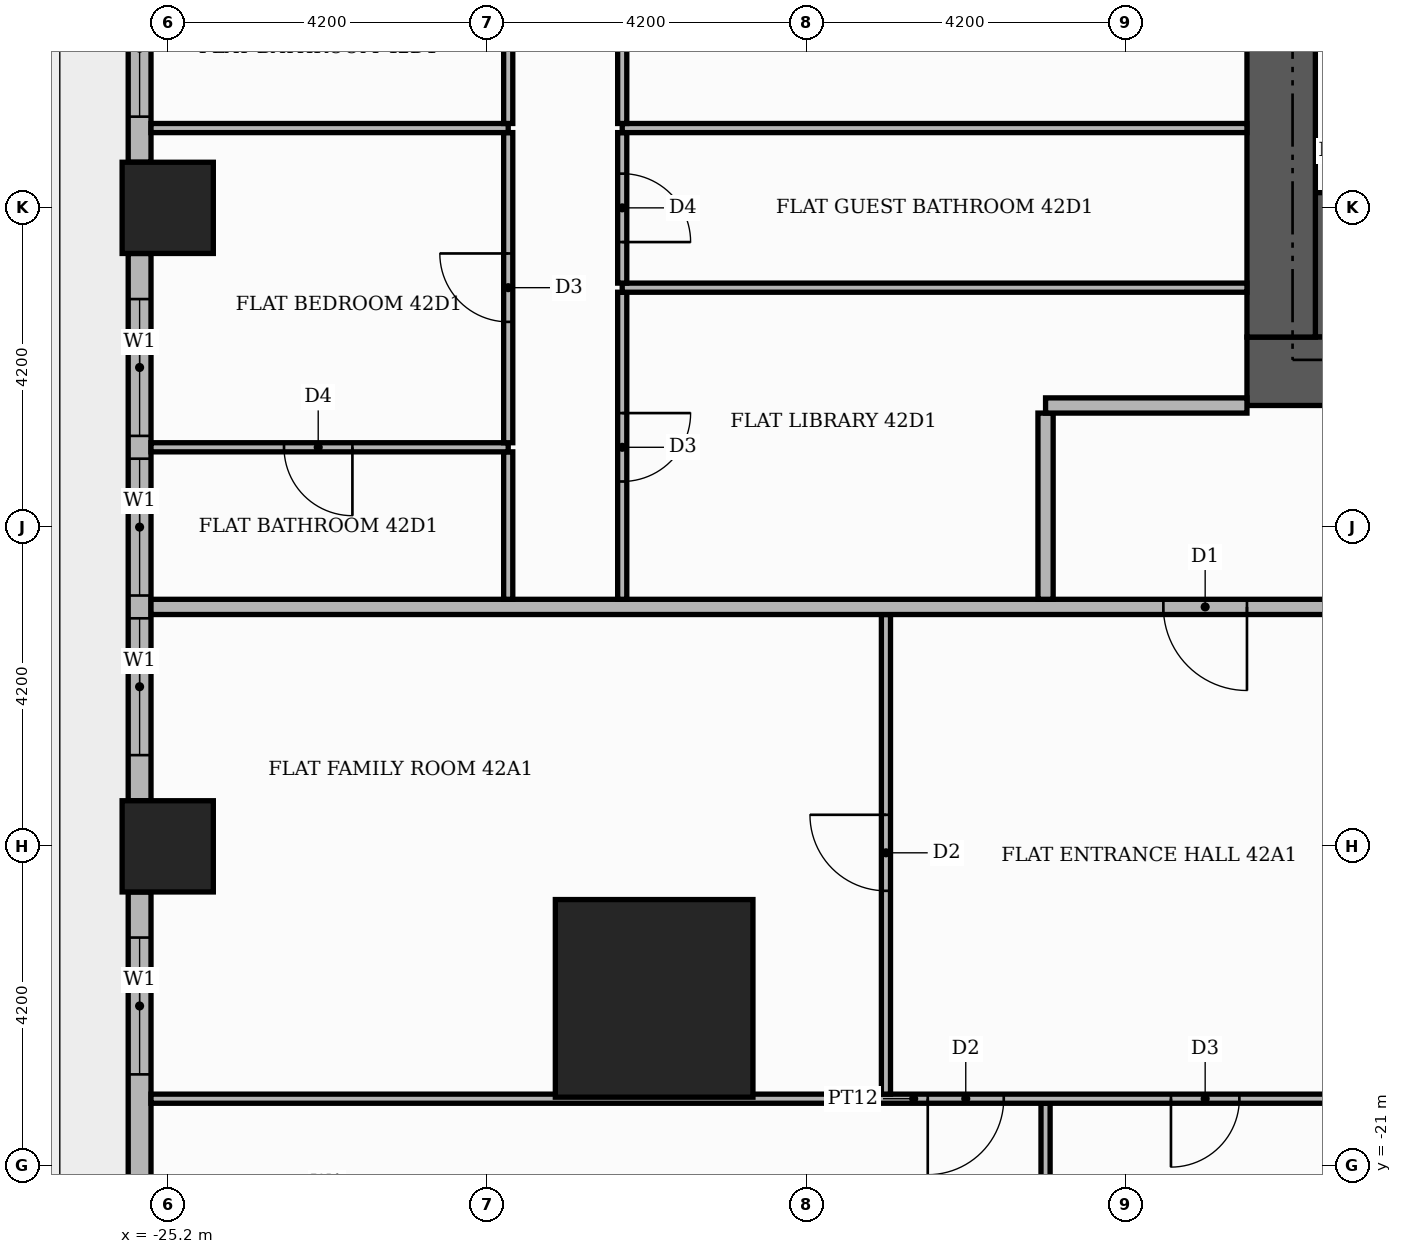
"""IFC4 building model, lengths in metres.
Left out: names, types, materials, properties, quantities, classifications, styles, units other than length and angle.
Written with IfcOpenShell. Run it as: python <this file> out.ifc"""

import sys

from ifc_helpers import new_model, si_unit, direction, frame, frame_2d, origin, origin_2d, place, context, subcontext, project, spatial, rectangle, extrude, element, fill, save


model = new_model("IFC4")
c1 = context("Model", 3, precision=1e-05, world=origin(), true_north=direction((0.0, 1.0)))
c2 = subcontext(c1, "Body", "Model", "MODEL_VIEW")
j1 = project(units=[si_unit("LENGTHUNIT", "METRE"), si_unit("PLANEANGLEUNIT", "RADIAN")], contexts=[c1])
p1 = place(None, origin())
s1 = spatial("IfcSite", under=j1, at=p1, CompositionType="ELEMENT")
p2 = place(p1, origin())
s2 = spatial("IfcBuilding", under=s1, at=p2, CompositionType="ELEMENT")
p3 = place(p2, frame((0.0, 0.0, 176.7)))
s3 = spatial("IfcBuildingStorey", under=s2, at=p3, CompositionType="ELEMENT", Elevation=176.7)
p4 = place(p3, frame((-10.1, -9.15, 0.0), z_axis=(0.0, 0.0, 1.0), x_axis=(1.0, 0.0, 0.0)))
e1 = element("IfcWall", 1, at=p4, inside=s3, PredefinedType="SHEAR", context=c2, shape_type="SweptSolid", body=[
    extrude(rectangle(XDim=4.6, YDim=1.9, at=frame_2d((2.3, 0.0))), origin(), (0.0, 0.0, 1.0), 3.4),
])
p5 = place(p3, frame((-11.0, -10.55, 0.0), z_axis=(0.0, 0.0, 1.0), x_axis=(1.0, 0.0, 0.0)))
e2 = element("IfcWall", 2, at=p5, inside=s3, PredefinedType="SHEAR", context=c2, shape_type="SweptSolid", body=[
    extrude(rectangle(XDim=22.0, YDim=0.9, at=frame_2d((11.0, 0.0))), origin(), (0.0, 0.0, 1.0), 3.4),
])
p6 = place(p5, frame((7.4, 0.0, 0.0)))
e3 = element("IfcOpeningElement", 3, at=p6, cuts=e2, PredefinedType="OPENING", context=c2, shape_type="SweptSolid", body=[
    extrude(rectangle(XDim=1.8, YDim=2.2, at=frame_2d((0.9, 1.1))), frame((0.0, 0.46, 0.0), z_axis=(0.0, -1.0, 0.0), x_axis=(1.0, 0.0, 0.0)), (0.0, 0.0, 1.0), 0.92),
])
p7 = place(p3, frame((-10.55, -10.1, 0.0), z_axis=(0.0, 0.0, 1.0), x_axis=(0.0, 1.0, 0.0)))
e4 = element("IfcWall", 4, at=p7, inside=s3, PredefinedType="SHEAR", context=c2, shape_type="SweptSolid", body=[
    extrude(rectangle(XDim=20.2, YDim=0.9, at=frame_2d((10.1, 0.0))), origin(), (0.0, 0.0, 1.0), 3.4),
])
p8 = place(p3, frame((-18.8, -18.8, 0.0), z_axis=(0.0, 0.0, 1.0), x_axis=(1.0, 0.0, 0.0)))
e5 = element("IfcColumn", 5, at=p8, inside=s3, PredefinedType="COLUMN", context=c2, shape_type="SweptSolid", body=[
    extrude(rectangle(XDim=2.6, YDim=2.6, at=origin_2d()), origin(), (0.0, 0.0, 1.0), 3.9),
])
for number, where, z_axis, x_axis in (
    (6, (-25.2, -8.4, 0.0), (0.0, 0.0, 1.0), (1.0, 0.0, 0.0)),
    (7, (-25.2, -16.8, 0.0), (0.0, 0.0, 1.0), (1.0, 0.0, 0.0)),
):
    element("IfcColumn", number, at=place(p3, frame(where, z_axis=z_axis, x_axis=x_axis)), inside=s3, PredefinedType="COLUMN", context=c2, shape_type="SweptSolid", body=[
        extrude(rectangle(XDim=1.2, YDim=1.2, at=origin_2d()), origin(), (0.0, 0.0, 1.0), 3.9),
    ])
p9 = place(p3, frame((-25.57, -0.6, 0.0), z_axis=(0.0, 0.0, 1.0), x_axis=(0.0, -1.0, 0.0)))
e8 = element("IfcWall", 8, at=p9, inside=s3, PredefinedType="STANDARD", context=c2, shape_type="SweptSolid", body=[
    extrude(rectangle(XDim=7.2, YDim=0.3, at=frame_2d((3.6, 0.0))), origin(), (0.0, 0.0, 1.0), 3.4),
])
p10 = place(p9, frame((0.6, 0.0, 0.9)))
e9 = element("IfcOpeningElement", 9, at=p10, cuts=e8, PredefinedType="OPENING", context=c2, shape_type="SweptSolid", body=[
    extrude(rectangle(XDim=3.9, YDim=2.1, at=frame_2d((1.95, 1.05))), frame((0.0, 0.16, 0.0), z_axis=(0.0, -1.0, 0.0), x_axis=(1.0, 0.0, 0.0)), (0.0, 0.0, 1.0), 0.32),
])
p11 = place(p9, frame((4.8, 0.0, 0.9)))
e10 = element("IfcOpeningElement", 10, at=p11, cuts=e8, PredefinedType="OPENING", context=c2, shape_type="SweptSolid", body=[
    extrude(rectangle(XDim=1.8, YDim=2.1, at=frame_2d((0.9, 1.05))), frame((0.0, 0.16, 0.0), z_axis=(0.0, -1.0, 0.0), x_axis=(1.0, 0.0, 0.0)), (0.0, 0.0, 1.0), 0.32),
])
p12 = place(p3, frame((-25.57, -9.0, 0.0), z_axis=(0.0, 0.0, 1.0), x_axis=(0.0, -1.0, 0.0)))
e11 = element("IfcWall", 11, at=p12, inside=s3, PredefinedType="STANDARD", context=c2, shape_type="SweptSolid", body=[
    extrude(rectangle(XDim=7.2, YDim=0.3, at=frame_2d((3.6, 0.0))), origin(), (0.0, 0.0, 1.0), 3.4),
])
p13 = place(p12, frame((0.6, 0.0, 0.9)))
e12 = element("IfcOpeningElement", 12, at=p13, cuts=e11, PredefinedType="OPENING", context=c2, shape_type="SweptSolid", body=[
    extrude(rectangle(XDim=1.8, YDim=2.1, at=frame_2d((0.9, 1.05))), frame((0.0, 0.16, 0.0), z_axis=(0.0, -1.0, 0.0), x_axis=(1.0, 0.0, 0.0)), (0.0, 0.0, 1.0), 0.32),
])
p14 = place(p12, frame((2.7, 0.0, 0.9)))
e13 = element("IfcOpeningElement", 13, at=p14, cuts=e11, PredefinedType="OPENING", context=c2, shape_type="SweptSolid", body=[
    extrude(rectangle(XDim=1.8, YDim=2.1, at=frame_2d((0.9, 1.05))), frame((0.0, 0.16, 0.0), z_axis=(0.0, -1.0, 0.0), x_axis=(1.0, 0.0, 0.0)), (0.0, 0.0, 1.0), 0.32),
])
p15 = place(p12, frame((4.8, 0.0, 0.9)))
e14 = element("IfcOpeningElement", 14, at=p15, cuts=e11, PredefinedType="OPENING", context=c2, shape_type="SweptSolid", body=[
    extrude(rectangle(XDim=1.8, YDim=2.1, at=frame_2d((0.9, 1.05))), frame((0.0, 0.16, 0.0), z_axis=(0.0, -1.0, 0.0), x_axis=(1.0, 0.0, 0.0)), (0.0, 0.0, 1.0), 0.32),
])
p16 = place(p3, frame((-25.57, -17.4, 0.0), z_axis=(0.0, 0.0, 1.0), x_axis=(0.0, -1.0, 0.0)))
e15 = element("IfcWall", 15, at=p16, inside=s3, PredefinedType="STANDARD", context=c2, shape_type="SweptSolid", body=[
    extrude(rectangle(XDim=4.32, YDim=0.3, at=frame_2d((2.16, 0.0))), origin(), (0.0, 0.0, 1.0), 3.4),
])
p17 = place(p16, frame((0.6, 0.0, 0.9)))
e16 = element("IfcOpeningElement", 16, at=p17, cuts=e15, PredefinedType="OPENING", context=c2, shape_type="SweptSolid", body=[
    extrude(rectangle(XDim=1.8, YDim=2.1, at=frame_2d((0.9, 1.05))), frame((0.0, 0.16, 0.0), z_axis=(0.0, -1.0, 0.0), x_axis=(1.0, 0.0, 0.0)), (0.0, 0.0, 1.0), 0.32),
])
p18 = place(p3, frame((-13.65, -25.42, 0.0), z_axis=(0.0, 0.0, 1.0), x_axis=(0.0, 1.0, 0.0)))
e17 = element("IfcWall", 17, at=p18, inside=s3, PredefinedType="PARTITIONING", context=c2, shape_type="SweptSolid", body=[
    extrude(rectangle(XDim=5.24, YDim=0.12, at=frame_2d((2.62, 0.0))), origin(), (0.0, 0.0, 1.0), 3.4),
])
p19 = place(p3, frame((-25.42, -20.12, 0.0), z_axis=(0.0, 0.0, 1.0), x_axis=(1.0, 0.0, 0.0)))
e18 = element("IfcWall", 18, at=p19, inside=s3, PredefinedType="PARTITIONING", context=c2, shape_type="SweptSolid", body=[
    extrude(rectangle(XDim=20.07, YDim=0.12, at=frame_2d((10.035, 0.0))), origin(), (0.0, 0.0, 1.0), 3.4),
])
p20 = place(p19, frame((10.22, 0.0, 0.0)))
e19 = element("IfcOpeningElement", 19, at=p20, cuts=e18, PredefinedType="OPENING", context=c2, shape_type="SweptSolid", body=[
    extrude(rectangle(XDim=1.0, YDim=2.1, at=frame_2d((0.5, 1.05))), frame((0.0, 0.07, 0.0), z_axis=(0.0, -1.0, 0.0), x_axis=(1.0, 0.0, 0.0)), (0.0, 0.0, 1.0), 0.14),
])
p21 = place(p19, frame((13.42, 0.0, 0.0)))
e20 = element("IfcOpeningElement", 20, at=p21, cuts=e18, PredefinedType="OPENING", context=c2, shape_type="SweptSolid", body=[
    extrude(rectangle(XDim=0.9, YDim=2.1, at=frame_2d((0.45, 1.05))), frame((0.0, 0.07, 0.0), z_axis=(0.0, -1.0, 0.0), x_axis=(1.0, 0.0, 0.0)), (0.0, 0.0, 1.0), 0.14),
])
p22 = place(p3, frame((-15.75, -20.06, 0.0), z_axis=(0.0, 0.0, 1.0), x_axis=(0.0, 1.0, 0.0)))
e21 = element("IfcWall", 21, at=p22, inside=s3, PredefinedType="PARTITIONING", context=c2, shape_type="SweptSolid", body=[
    extrude(rectangle(XDim=6.31, YDim=0.12, at=frame_2d((3.155, 0.0))), origin(), (0.0, 0.0, 1.0), 3.4),
])
p23 = place(p22, frame((2.675, 0.0, 0.0)))
e22 = element("IfcOpeningElement", 22, at=p23, cuts=e21, PredefinedType="OPENING", context=c2, shape_type="SweptSolid", body=[
    extrude(rectangle(XDim=1.0, YDim=2.1, at=frame_2d((0.5, 1.05))), frame((0.0, 0.07, 0.0), z_axis=(0.0, -1.0, 0.0), x_axis=(1.0, 0.0, 0.0)), (0.0, 0.0, 1.0), 0.14),
])
p24 = place(p3, frame((-25.42, -13.65, 0.0), z_axis=(0.0, 0.0, 1.0), x_axis=(1.0, 0.0, 0.0)))
e23 = element("IfcWall", 23, at=p24, inside=s3, PredefinedType="PARTITIONING", context=c2, shape_type="SweptSolid", body=[
    extrude(rectangle(XDim=39.07, YDim=0.2, at=frame_2d((19.535, 0.0))), origin(), (0.0, 0.0, 1.0), 3.4),
])
p25 = place(p24, frame((13.32, 0.0, 0.0)))
e24 = element("IfcOpeningElement", 24, at=p25, cuts=e23, PredefinedType="OPENING", context=c2, shape_type="SweptSolid", body=[
    extrude(rectangle(XDim=1.1, YDim=2.4, at=frame_2d((0.55, 1.2))), frame((0.0, 0.11, 0.0), z_axis=(0.0, -1.0, 0.0), x_axis=(1.0, 0.0, 0.0)), (0.0, 0.0, 1.0), 0.22),
])
p26 = place(p24, frame((21.72, 0.0, 0.0)))
e25 = element("IfcOpeningElement", 25, at=p26, cuts=e23, PredefinedType="OPENING", context=c2, shape_type="SweptSolid", body=[
    extrude(rectangle(XDim=1.1, YDim=2.4, at=frame_2d((0.55, 1.2))), frame((0.0, 0.11, 0.0), z_axis=(0.0, -1.0, 0.0), x_axis=(1.0, 0.0, 0.0)), (0.0, 0.0, 1.0), 0.22),
])
p27 = place(p3, frame((-20.72, -13.55, 0.0), z_axis=(0.0, 0.0, 1.0), x_axis=(0.0, 1.0, 0.0)))
e26 = element("IfcWall", 26, at=p27, inside=s3, PredefinedType="PARTITIONING", context=c2, shape_type="SweptSolid", body=[
    extrude(rectangle(XDim=1.94, YDim=0.12, at=frame_2d((0.97, 0.0))), origin(), (0.0, 0.0, 1.0), 3.4),
])
p28 = place(p3, frame((-19.22, -13.55, 0.0), z_axis=(0.0, 0.0, 1.0), x_axis=(0.0, 1.0, 0.0)))
e27 = element("IfcWall", 27, at=p28, inside=s3, PredefinedType="PARTITIONING", context=c2, shape_type="SweptSolid", body=[
    extrude(rectangle(XDim=4.04, YDim=0.12, at=frame_2d((2.02, 0.0))), origin(), (0.0, 0.0, 1.0), 3.4),
])
p29 = place(p28, frame((1.55, 0.0, 0.0)))
e28 = element("IfcOpeningElement", 28, at=p29, cuts=e27, PredefinedType="OPENING", context=c2, shape_type="SweptSolid", body=[
    extrude(rectangle(XDim=0.9, YDim=2.1, at=frame_2d((0.45, 1.05))), frame((0.0, 0.07, 0.0), z_axis=(0.0, -1.0, 0.0), x_axis=(1.0, 0.0, 0.0)), (0.0, 0.0, 1.0), 0.14),
])
p30 = place(p3, frame((-13.65, -13.55, 0.0), z_axis=(0.0, 0.0, 1.0), x_axis=(0.0, 1.0, 0.0)))
e29 = element("IfcWall", 29, at=p30, inside=s3, PredefinedType="PARTITIONING", context=c2, shape_type="SweptSolid", body=[
    extrude(rectangle(XDim=2.45, YDim=0.2, at=frame_2d((1.225, 0.0))), origin(), (0.0, 0.0, 1.0), 3.4),
])
p31 = place(p3, frame((-25.42, -11.55, 0.0), z_axis=(0.0, 0.0, 1.0), x_axis=(1.0, 0.0, 0.0)))
e30 = element("IfcWall", 30, at=p31, inside=s3, PredefinedType="PARTITIONING", context=c2, shape_type="SweptSolid", body=[
    extrude(rectangle(XDim=4.7, YDim=0.12, at=frame_2d((2.35, 0.0))), origin(), (0.0, 0.0, 1.0), 3.4),
])
p32 = place(p31, frame((1.75, 0.0, 0.0)))
e31 = element("IfcOpeningElement", 31, at=p32, cuts=e30, PredefinedType="OPENING", context=c2, shape_type="SweptSolid", body=[
    extrude(rectangle(XDim=0.9, YDim=2.1, at=frame_2d((0.45, 1.05))), frame((0.0, 0.07, 0.0), z_axis=(0.0, -1.0, 0.0), x_axis=(1.0, 0.0, 0.0)), (0.0, 0.0, 1.0), 0.14),
])
p33 = place(p3, frame((-20.72, -11.49, 0.0), z_axis=(0.0, 0.0, 1.0), x_axis=(0.0, 1.0, 0.0)))
e32 = element("IfcWall", 32, at=p33, inside=s3, PredefinedType="PARTITIONING", context=c2, shape_type="SweptSolid", body=[
    extrude(rectangle(XDim=4.08, YDim=0.12, at=frame_2d((2.04, 0.0))), origin(), (0.0, 0.0, 1.0), 3.4),
])
p34 = place(p33, frame((1.59, 0.0, 0.0)))
e33 = element("IfcOpeningElement", 33, at=p34, cuts=e32, PredefinedType="OPENING", context=c2, shape_type="SweptSolid", body=[
    extrude(rectangle(XDim=0.9, YDim=2.1, at=frame_2d((0.45, 1.05))), frame((0.0, 0.07, 0.0), z_axis=(0.0, -1.0, 0.0), x_axis=(1.0, 0.0, 0.0)), (0.0, 0.0, 1.0), 0.14),
])
p35 = place(p3, frame((-13.65, -11.0, 0.0), z_axis=(0.0, 0.0, 1.0), x_axis=(1.0, 0.0, 0.0)))
e34 = element("IfcWall", 34, at=p35, inside=s3, PredefinedType="PARTITIONING", context=c2, shape_type="SweptSolid", body=[
    extrude(rectangle(XDim=2.65, YDim=0.2, at=frame_2d((1.325, 0.0))), origin(), (0.0, 0.0, 1.0), 3.4),
])
p36 = place(p3, frame((-19.22, -9.45, 0.0), z_axis=(0.0, 0.0, 1.0), x_axis=(1.0, 0.0, 0.0)))
e35 = element("IfcWall", 35, at=p36, inside=s3, PredefinedType="PARTITIONING", context=c2, shape_type="SweptSolid", body=[
    extrude(rectangle(XDim=8.22, YDim=0.12, at=frame_2d((4.11, 0.0))), origin(), (0.0, 0.0, 1.0), 3.4),
])
p37 = place(p3, frame((-19.22, -9.39, 0.0), z_axis=(0.0, 0.0, 1.0), x_axis=(0.0, 1.0, 0.0)))
e36 = element("IfcWall", 36, at=p37, inside=s3, PredefinedType="PARTITIONING", context=c2, shape_type="SweptSolid", body=[
    extrude(rectangle(XDim=1.98, YDim=0.12, at=frame_2d((0.99, 0.0))), origin(), (0.0, 0.0, 1.0), 3.4),
])
p38 = place(p37, frame((0.54, 0.0, 0.0)))
e37 = element("IfcOpeningElement", 37, at=p38, cuts=e36, PredefinedType="OPENING", context=c2, shape_type="SweptSolid", body=[
    extrude(rectangle(XDim=0.9, YDim=2.1, at=frame_2d((0.45, 1.05))), frame((0.0, 0.07, 0.0), z_axis=(0.0, -1.0, 0.0), x_axis=(1.0, 0.0, 0.0)), (0.0, 0.0, 1.0), 0.14),
])
p39 = place(p3, frame((-25.42, -7.35, 0.0), z_axis=(0.0, 0.0, 1.0), x_axis=(1.0, 0.0, 0.0)))
e38 = element("IfcWall", 38, at=p39, inside=s3, PredefinedType="PARTITIONING", context=c2, shape_type="SweptSolid", body=[
    extrude(rectangle(XDim=4.7, YDim=0.12, at=frame_2d((2.35, 0.0))), origin(), (0.0, 0.0, 1.0), 3.4),
])
p40 = place(p3, frame((-19.22, -7.35, 0.0), z_axis=(0.0, 0.0, 1.0), x_axis=(1.0, 0.0, 0.0)))
e39 = element("IfcWall", 39, at=p40, inside=s3, PredefinedType="PARTITIONING", context=c2, shape_type="SweptSolid", body=[
    extrude(rectangle(XDim=8.22, YDim=0.12, at=frame_2d((4.11, 0.0))), origin(), (0.0, 0.0, 1.0), 3.4),
])
p41 = place(p3, frame((-20.72, -7.29, 0.0), z_axis=(0.0, 0.0, 1.0), x_axis=(0.0, 1.0, 0.0)))
e40 = element("IfcWall", 40, at=p41, inside=s3, PredefinedType="PARTITIONING", context=c2, shape_type="SweptSolid", body=[
    extrude(rectangle(XDim=1.98, YDim=0.12, at=frame_2d((0.99, 0.0))), origin(), (0.0, 0.0, 1.0), 3.4),
])
p42 = place(p3, frame((-19.22, -7.29, 0.0), z_axis=(0.0, 0.0, 1.0), x_axis=(0.0, 1.0, 0.0)))
e41 = element("IfcWall", 41, at=p42, inside=s3, PredefinedType="PARTITIONING", context=c2, shape_type="SweptSolid", body=[
    extrude(rectangle(XDim=4.08, YDim=0.12, at=frame_2d((2.04, 0.0))), origin(), (0.0, 0.0, 1.0), 3.4),
])
p43 = place(p42, frame((1.59, 0.0, 0.0)))
e42 = element("IfcOpeningElement", 42, at=p43, cuts=e41, PredefinedType="OPENING", context=c2, shape_type="SweptSolid", body=[
    extrude(rectangle(XDim=0.9, YDim=2.1, at=frame_2d((0.45, 1.05))), frame((0.0, 0.07, 0.0), z_axis=(0.0, -1.0, 0.0), x_axis=(1.0, 0.0, 0.0)), (0.0, 0.0, 1.0), 0.14),
])
p44 = place(p11, origin())
e43 = element("IfcWindow", 43, at=p44, inside=s3, PartitioningType="SINGLE_PANEL", PredefinedType="WINDOW", context=c2, shape_type="SweptSolid", body=[
    extrude(rectangle(XDim=1.8, YDim=2.1, at=frame_2d((0.9, 1.05))), frame((0.0, 0.03, 0.0), z_axis=(0.0, -1.0, 0.0), x_axis=(1.0, 0.0, 0.0)), (0.0, 0.0, 1.0), 0.06),
])
fill(e10, e43)
p45 = place(p13, origin())
e44 = element("IfcWindow", 44, at=p45, inside=s3, PartitioningType="SINGLE_PANEL", PredefinedType="WINDOW", context=c2, shape_type="SweptSolid", body=[
    extrude(rectangle(XDim=1.8, YDim=2.1, at=frame_2d((0.9, 1.05))), frame((0.0, 0.03, 0.0), z_axis=(0.0, -1.0, 0.0), x_axis=(1.0, 0.0, 0.0)), (0.0, 0.0, 1.0), 0.06),
])
fill(e12, e44)
p46 = place(p14, origin())
e45 = element("IfcWindow", 45, at=p46, inside=s3, PartitioningType="SINGLE_PANEL", PredefinedType="WINDOW", context=c2, shape_type="SweptSolid", body=[
    extrude(rectangle(XDim=1.8, YDim=2.1, at=frame_2d((0.9, 1.05))), frame((0.0, 0.03, 0.0), z_axis=(0.0, -1.0, 0.0), x_axis=(1.0, 0.0, 0.0)), (0.0, 0.0, 1.0), 0.06),
])
fill(e13, e45)
p47 = place(p15, origin())
e46 = element("IfcWindow", 46, at=p47, inside=s3, PartitioningType="SINGLE_PANEL", PredefinedType="WINDOW", context=c2, shape_type="SweptSolid", body=[
    extrude(rectangle(XDim=1.8, YDim=2.1, at=frame_2d((0.9, 1.05))), frame((0.0, 0.03, 0.0), z_axis=(0.0, -1.0, 0.0), x_axis=(1.0, 0.0, 0.0)), (0.0, 0.0, 1.0), 0.06),
])
fill(e14, e46)
p48 = place(p17, origin())
e47 = element("IfcWindow", 47, at=p48, inside=s3, PartitioningType="SINGLE_PANEL", PredefinedType="WINDOW", context=c2, shape_type="SweptSolid", body=[
    extrude(rectangle(XDim=1.8, YDim=2.1, at=frame_2d((0.9, 1.05))), frame((0.0, 0.03, 0.0), z_axis=(0.0, -1.0, 0.0), x_axis=(1.0, 0.0, 0.0)), (0.0, 0.0, 1.0), 0.06),
])
fill(e16, e47)
p49 = place(p25, frame((1.1, 0.0, 0.0), z_axis=(0.0, 0.0, 1.0), x_axis=(-1.0, 0.0, 0.0)))
e48 = element("IfcDoor", 48, at=p49, inside=s3, OperationType="SINGLE_SWING_RIGHT", PredefinedType="DOOR", context=c2, shape_type="SweptSolid", body=[
    extrude(rectangle(XDim=1.1, YDim=2.4, at=frame_2d((0.55, 1.2))), frame((0.0, 0.025, 0.0), z_axis=(0.0, -1.0, 0.0), x_axis=(1.0, 0.0, 0.0)), (0.0, 0.0, 1.0), 0.05),
])
fill(e24, e48)
p50 = place(p23, origin())
e49 = element("IfcDoor", 49, at=p50, inside=s3, OperationType="SINGLE_SWING_RIGHT", PredefinedType="DOOR", context=c2, shape_type="SweptSolid", body=[
    extrude(rectangle(XDim=1.0, YDim=2.1, at=frame_2d((0.5, 1.05))), frame((0.0, 0.025, 0.0), z_axis=(0.0, -1.0, 0.0), x_axis=(1.0, 0.0, 0.0)), (0.0, 0.0, 1.0), 0.05),
])
fill(e22, e49)
p51 = place(p20, frame((1.0, 0.0, 0.0), z_axis=(0.0, 0.0, 1.0), x_axis=(-1.0, 0.0, 0.0)))
e50 = element("IfcDoor", 50, at=p51, inside=s3, OperationType="SINGLE_SWING_LEFT", PredefinedType="DOOR", context=c2, shape_type="SweptSolid", body=[
    extrude(rectangle(XDim=1.0, YDim=2.1, at=frame_2d((0.5, 1.05))), frame((0.0, 0.025, 0.0), z_axis=(0.0, -1.0, 0.0), x_axis=(1.0, 0.0, 0.0)), (0.0, 0.0, 1.0), 0.05),
])
fill(e19, e50)
p52 = place(p21, frame((0.9, 0.0, 0.0), z_axis=(0.0, 0.0, 1.0), x_axis=(-1.0, 0.0, 0.0)))
e51 = element("IfcDoor", 51, at=p52, inside=s3, OperationType="SINGLE_SWING_LEFT", PredefinedType="DOOR", context=c2, shape_type="SweptSolid", body=[
    extrude(rectangle(XDim=0.9, YDim=2.1, at=frame_2d((0.45, 1.05))), frame((0.0, 0.025, 0.0), z_axis=(0.0, -1.0, 0.0), x_axis=(1.0, 0.0, 0.0)), (0.0, 0.0, 1.0), 0.05),
])
fill(e20, e51)
p53 = place(p38, frame((0.9, 0.0, 0.0), z_axis=(0.0, 0.0, 1.0), x_axis=(-1.0, 0.0, 0.0)))
e52 = element("IfcDoor", 52, at=p53, inside=s3, OperationType="SINGLE_SWING_LEFT", PredefinedType="DOOR", context=c2, shape_type="SweptSolid", body=[
    extrude(rectangle(XDim=0.9, YDim=2.1, at=frame_2d((0.45, 1.05))), frame((0.0, 0.025, 0.0), z_axis=(0.0, -1.0, 0.0), x_axis=(1.0, 0.0, 0.0)), (0.0, 0.0, 1.0), 0.05),
])
fill(e37, e52)
p54 = place(p29, frame((0.9, 0.0, 0.0), z_axis=(0.0, 0.0, 1.0), x_axis=(-1.0, 0.0, 0.0)))
e53 = element("IfcDoor", 53, at=p54, inside=s3, OperationType="SINGLE_SWING_RIGHT", PredefinedType="DOOR", context=c2, shape_type="SweptSolid", body=[
    extrude(rectangle(XDim=0.9, YDim=2.1, at=frame_2d((0.45, 1.05))), frame((0.0, 0.025, 0.0), z_axis=(0.0, -1.0, 0.0), x_axis=(1.0, 0.0, 0.0)), (0.0, 0.0, 1.0), 0.05),
])
fill(e28, e53)
p55 = place(p34, origin())
e54 = element("IfcDoor", 54, at=p55, inside=s3, OperationType="SINGLE_SWING_RIGHT", PredefinedType="DOOR", context=c2, shape_type="SweptSolid", body=[
    extrude(rectangle(XDim=0.9, YDim=2.1, at=frame_2d((0.45, 1.05))), frame((0.0, 0.025, 0.0), z_axis=(0.0, -1.0, 0.0), x_axis=(1.0, 0.0, 0.0)), (0.0, 0.0, 1.0), 0.05),
])
fill(e33, e54)
p56 = place(p32, frame((0.9, 0.0, 0.0), z_axis=(0.0, 0.0, 1.0), x_axis=(-1.0, 0.0, 0.0)))
e55 = element("IfcDoor", 55, at=p56, inside=s3, OperationType="SINGLE_SWING_RIGHT", PredefinedType="DOOR", context=c2, shape_type="SweptSolid", body=[
    extrude(rectangle(XDim=0.9, YDim=2.1, at=frame_2d((0.45, 1.05))), frame((0.0, 0.025, 0.0), z_axis=(0.0, -1.0, 0.0), x_axis=(1.0, 0.0, 0.0)), (0.0, 0.0, 1.0), 0.05),
])
fill(e31, e55)
save(model, sys.argv[1])
